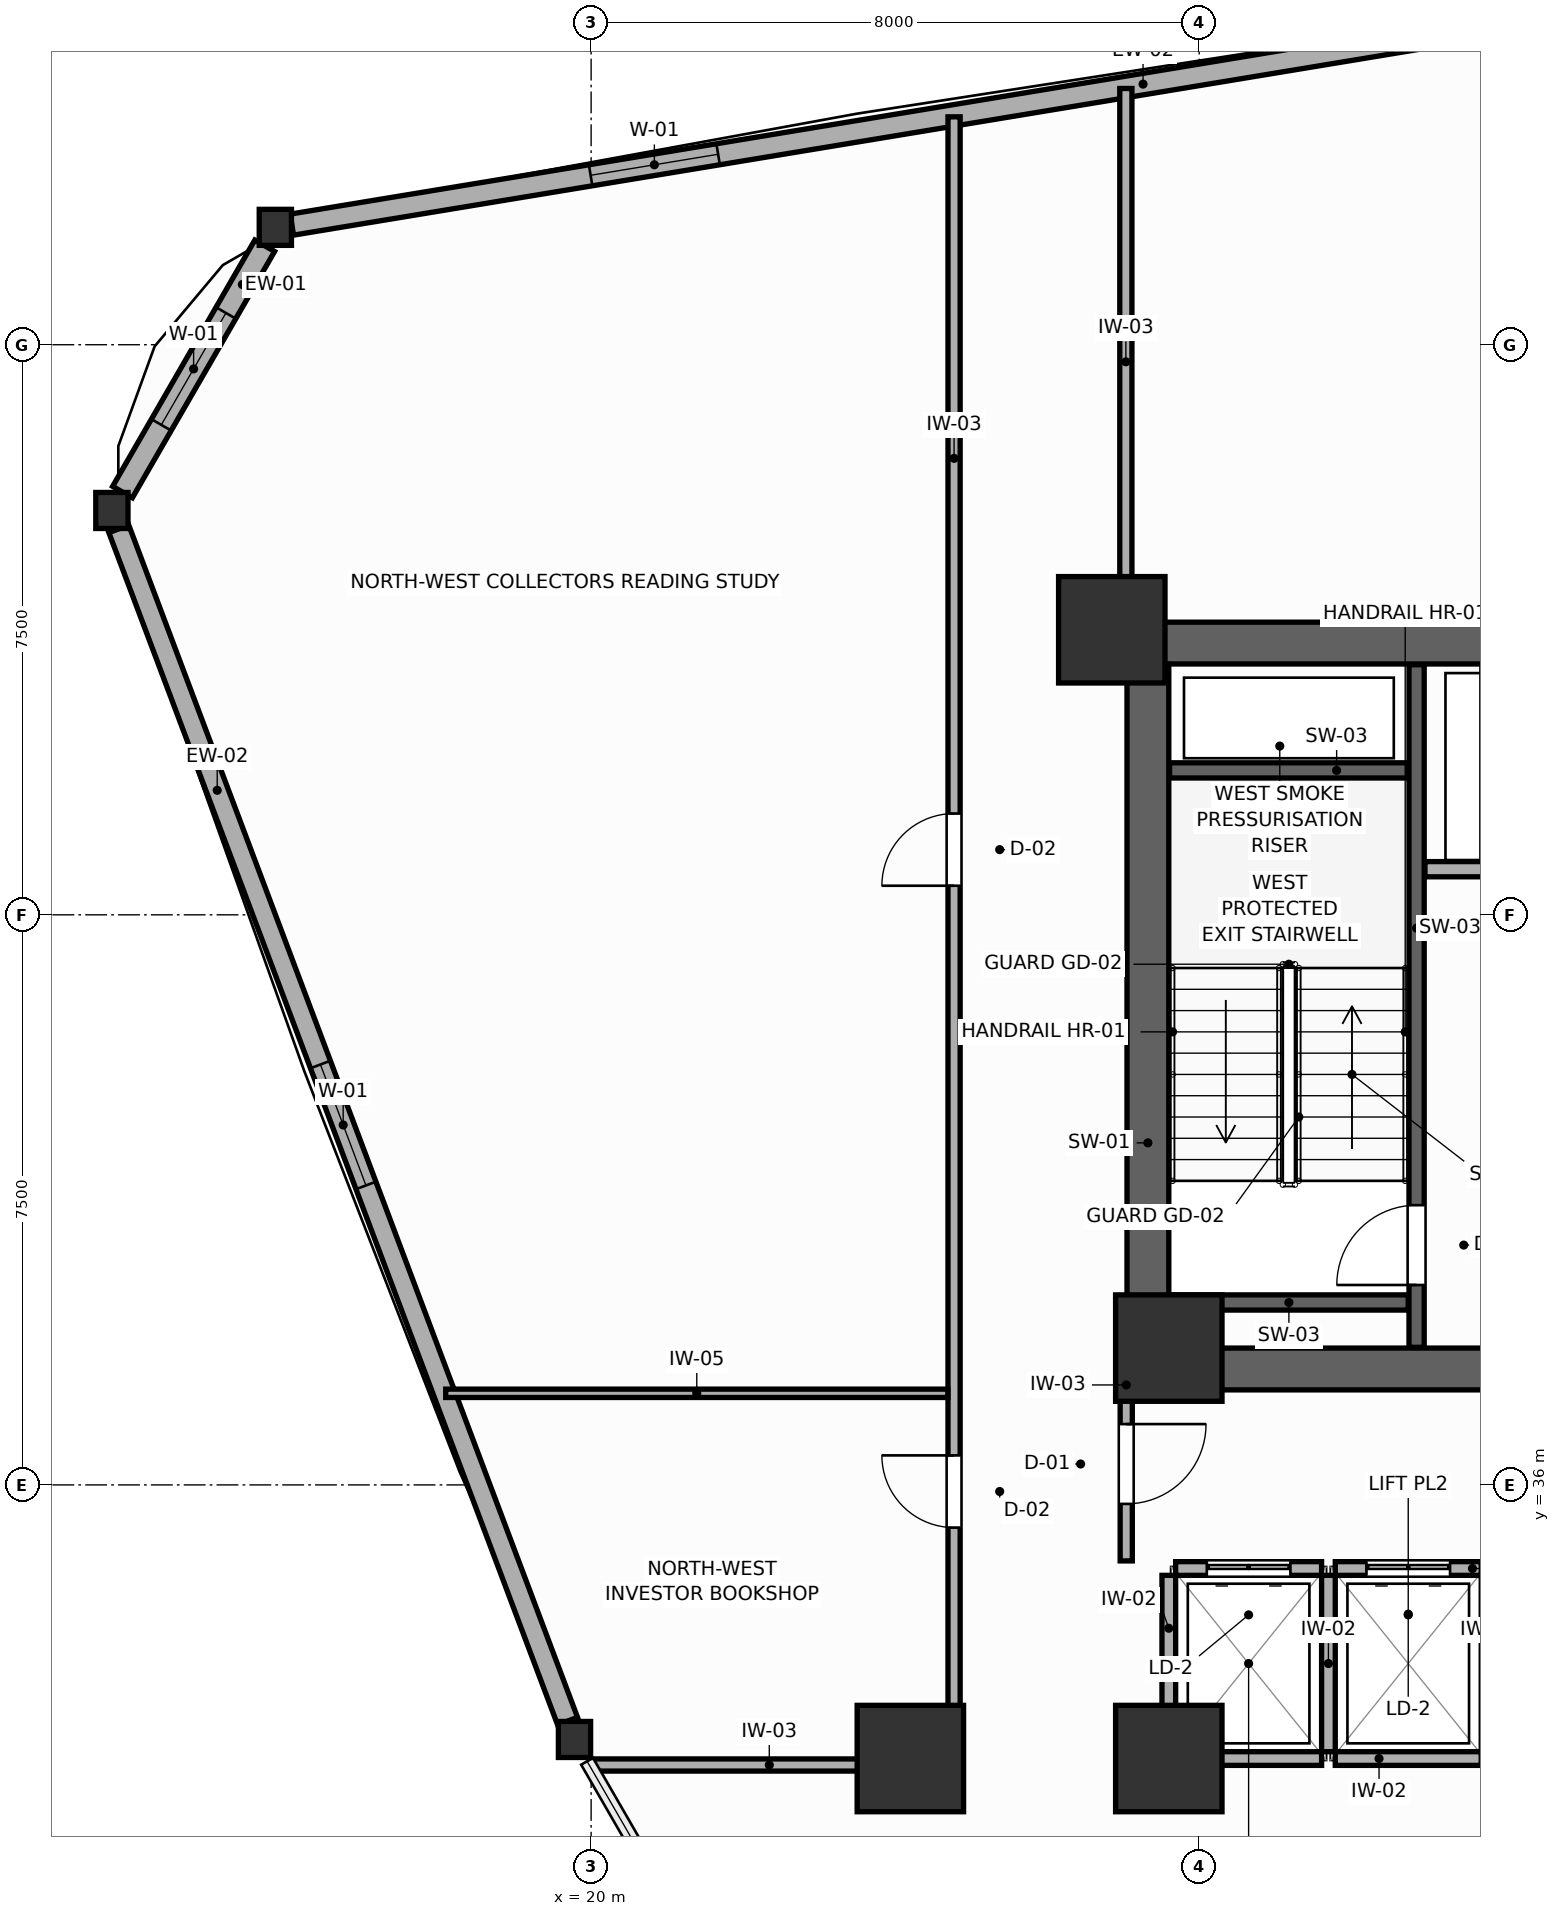
"""IFC4 building model, lengths in metres.
Left out: names, types, materials, properties, quantities, classifications, styles, units other than length and angle.
Written with IfcOpenShell. Run it as: python <this file> out.ifc"""

import sys

from ifc_helpers import new_model, si_unit, direction, frame, frame_2d, origin, origin_2d, place, context, subcontext, project, spatial, rectangle, i_section, extrude, source, transform, mapped, element, fill, save


model = new_model("IFC4")
c1 = context("Model", 3, precision=1e-05, world=origin(), true_north=direction((0.0, 1.0)))
c2 = subcontext(c1, "Body", "Model", "MODEL_VIEW")
j1 = project(units=[si_unit("LENGTHUNIT", "METRE"), si_unit("PLANEANGLEUNIT", "RADIAN")], contexts=[c1])
p1 = place(None, origin())
s1 = spatial("IfcSite", under=j1, at=p1, CompositionType="ELEMENT")
p2 = place(p1, origin())
s2 = spatial("IfcBuilding", under=s1, at=p2, CompositionType="ELEMENT")
p3 = place(p2, frame((0.0, 0.0, 87.3)))
s3 = spatial("IfcBuildingStorey", under=s2, at=p3, CompositionType="ELEMENT", Elevation=87.3)
p4 = place(p3, frame((27.05, 47.075, 0.0), z_axis=(0.0, 0.0, 1.0), x_axis=(1.0, 0.0, 0.0)))
e1 = element("IfcWall", 1, at=p4, inside=s3, PredefinedType="SHEAR", context=c2, shape_type="SweptSolid", body=[
    extrude(rectangle(XDim=17.9, YDim=0.55, at=frame_2d((8.95, 0.0))), origin(), (0.0, 0.0, 1.0), 3.9),
])
p5 = place(p3, frame((27.05, 37.525, 0.0), z_axis=(0.0, 0.0, 1.0), x_axis=(1.0, 0.0, 0.0)))
e2 = element("IfcWall", 2, at=p5, inside=s3, PredefinedType="SHEAR", context=c2, shape_type="SweptSolid", body=[
    extrude(rectangle(XDim=17.9, YDim=0.55, at=frame_2d((8.95, 0.0))), origin(), (0.0, 0.0, 1.0), 3.9),
])
p6 = place(p5, frame((4.975, 0.0, 0.0)))
e3 = element("IfcOpeningElement", 3, at=p6, cuts=e2, PredefinedType="OPENING", context=c2, shape_type="SweptSolid", body=[
    extrude(rectangle(XDim=1.05, YDim=2.1, at=frame_2d((0.525, 1.05))), frame((0.0, 0.285, 0.0), z_axis=(0.0, -1.0, 0.0), x_axis=(1.0, 0.0, 0.0)), (0.0, 0.0, 1.0), 0.57),
])
p7 = place(p5, frame((11.875, 0.0, 0.0)))
e4 = element("IfcOpeningElement", 4, at=p7, cuts=e2, PredefinedType="OPENING", context=c2, shape_type="SweptSolid", body=[
    extrude(rectangle(XDim=1.05, YDim=2.1, at=frame_2d((0.525, 1.05))), frame((0.0, 0.285, 0.0), z_axis=(0.0, -1.0, 0.0), x_axis=(1.0, 0.0, 0.0)), (0.0, 0.0, 1.0), 0.57),
])
p8 = place(p3, frame((27.325, 37.8, 0.0), z_axis=(0.0, 0.0, 1.0), x_axis=(0.0, 1.0, 0.0)))
e5 = element("IfcWall", 5, at=p8, inside=s3, PredefinedType="SHEAR", context=c2, shape_type="SweptSolid", body=[
    extrude(rectangle(XDim=9.0, YDim=0.55, at=frame_2d((4.5, 0.0))), origin(), (0.0, 0.0, 1.0), 3.9),
])
m1 = source(origin(), c2, "Body", "SweptSolid", [
    extrude(rectangle(XDim=1.4, YDim=1.4, at=origin_2d()), origin(), (0.0, 0.0, 1.0), 3.9),
])
for number, where, z_axis, x_axis in (
    (6, (26.85, 47.25, 0.0), (0.0, 0.0, 1.0), (1.0, 0.0, 0.0)),
    (7, (27.6, 37.8, 0.0), (0.0, 0.0, 1.0), (1.0, 0.0, 0.0)),
    (8, (27.6, 32.4, 0.0), (0.0, 0.0, 1.0), (1.0, 0.0, 0.0)),
    (9, (24.2, 32.4, 0.0), (0.0, 0.0, 1.0), (1.0, 0.0, 0.0)),
):
    element("IfcColumn", number, at=place(p3, frame(where, z_axis=z_axis, x_axis=x_axis)), inside=s3, PredefinedType="COLUMN", context=c2, shape_type="MappedRepresentation", body=[
        mapped(m1, transform((0.0, 0.0, 0.0), scale=1.0)),
    ])
m2 = source(origin(), c2, "Body", "SweptSolid", [
    extrude(i_section(OverallWidth=0.424, OverallDepth=0.474, WebThickness=0.045, FlangeThickness=0.072, FilletRadius=0.015, at=origin_2d()), origin(), (0.0, 0.0, 1.0), 3.9),
])
for number, where, z_axis, x_axis in (
    (10, (15.845, 52.544, 0.0), (0.0, 0.0, 1.0), (1.0, 0.0, 0.0)),
    (11, (13.695, 48.82, 0.0), (0.0, 0.0, 1.0), (1.0, 0.0, 0.0)),
    (12, (19.781, 32.651, 0.0), (0.0, 0.0, 1.0), (1.0, 0.0, 0.0)),
):
    element("IfcColumn", number, at=place(p3, frame(where, z_axis=z_axis, x_axis=x_axis)), inside=s3, PredefinedType="COLUMN", context=c2, shape_type="MappedRepresentation", body=[
        mapped(m2, transform((0.0, 0.0, 0.0), scale=1.0)),
    ])
p9 = place(p3, frame((32.674, 55.322, 0.0), z_axis=(0.0, 0.0, 1.0), x_axis=(-0.986649424809, -0.162858566012, 0.0)))
e13 = element("IfcWall", 13, at=p9, inside=s3, PredefinedType="SOLIDWALL", context=c2, shape_type="SweptSolid", body=[
    extrude(rectangle(XDim=16.836, YDim=0.28, at=frame_2d((8.418, 0.0))), origin(), (0.0, 0.0, 1.0), 3.23),
])
p10 = place(p9, frame((11.152, 0.0, 0.75)))
e14 = element("IfcOpeningElement", 14, at=p10, cuts=e13, PredefinedType="OPENING", context=c2, shape_type="SweptSolid", body=[
    extrude(rectangle(XDim=1.7, YDim=1.75, at=frame_2d((0.85, 0.875))), frame((0.0, 0.15, 0.0), z_axis=(0.0, -1.0, 0.0), x_axis=(1.0, 0.0, 0.0)), (0.0, 0.0, 1.0), 0.3),
])
p11 = place(p3, frame((15.706, 52.302, 0.0), z_axis=(0.0, 0.0, 1.0), x_axis=(-0.500012356405, -0.866018269693, 0.0)))
e15 = element("IfcWall", 15, at=p11, inside=s3, PredefinedType="SOLIDWALL", context=c2, shape_type="SweptSolid", body=[
    extrude(rectangle(XDim=3.742, YDim=0.3, at=frame_2d((1.871, 0.0))), origin(), (0.0, 0.0, 1.0), 3.23),
])
p12 = place(p11, frame((1.021, 0.0, 0.75)))
e16 = element("IfcOpeningElement", 16, at=p12, cuts=e15, PredefinedType="OPENING", context=c2, shape_type="SweptSolid", body=[
    extrude(rectangle(XDim=1.7, YDim=1.75, at=frame_2d((0.85, 0.875))), frame((0.0, 0.16, 0.0), z_axis=(0.0, -1.0, 0.0), x_axis=(1.0, 0.0, 0.0)), (0.0, 0.0, 1.0), 0.32),
])
p13 = place(p3, frame((13.786, 48.577, 0.0), z_axis=(0.0, 0.0, 1.0), x_axis=(0.352279020809, -0.935895021622, 0.0)))
e17 = element("IfcWall", 17, at=p13, inside=s3, PredefinedType="SOLIDWALL", context=c2, shape_type="SweptSolid", body=[
    extrude(rectangle(XDim=16.759, YDim=0.28, at=frame_2d((8.379, 0.0))), origin(), (0.0, 0.0, 1.0), 3.23),
])
p14 = place(p13, frame((7.53, 0.0, 0.75)))
e18 = element("IfcOpeningElement", 18, at=p14, cuts=e17, PredefinedType="OPENING", context=c2, shape_type="SweptSolid", body=[
    extrude(rectangle(XDim=1.7, YDim=1.75, at=frame_2d((0.85, 0.875))), frame((0.0, 0.15, 0.0), z_axis=(0.0, -1.0, 0.0), x_axis=(1.0, 0.0, 0.0)), (0.0, 0.0, 1.0), 0.3),
])
p15 = place(p3, frame((30.86, 37.81, 0.0), z_axis=(0.0, 0.0, 1.0), x_axis=(0.0, 1.0, 0.0)))
e19 = element("IfcWall", 19, at=p15, inside=s3, PredefinedType="SHEAR", context=c2, shape_type="SweptSolid", body=[
    extrude(rectangle(XDim=8.98, YDim=0.2, at=frame_2d((4.49, 0.0))), origin(), (0.0, 0.0, 1.0), 3.9),
])
p16 = place(p15, frame((0.82, 0.0, 0.0)))
e20 = element("IfcOpeningElement", 20, at=p16, cuts=e19, PredefinedType="OPENING", context=c2, shape_type="SweptSolid", body=[
    extrude(rectangle(XDim=1.05, YDim=2.1, at=frame_2d((0.525, 1.05))), frame((0.0, 0.11, 0.0), z_axis=(0.0, -1.0, 0.0), x_axis=(1.0, 0.0, 0.0)), (0.0, 0.0, 1.0), 0.22),
])
for number, where, z_axis, x_axis in (
    (21, (27.61, 45.4, 0.0), (0.0, 0.0, 1.0), (1.0, 0.0, 0.0)),
    (22, (27.61, 38.4, 0.0), (0.0, 0.0, 1.0), (1.0, 0.0, 0.0)),
):
    element("IfcWall", number, at=place(p3, frame(where, z_axis=z_axis, x_axis=x_axis)), inside=s3, PredefinedType="SHEAR", context=c2, shape_type="SweptSolid", body=[
        extrude(rectangle(XDim=3.14, YDim=0.2, at=frame_2d((1.57, 0.0))), origin(), (0.0, 0.0, 1.0), 3.9),
    ])
p17 = place(p3, frame((30.97, 44.1, 0.0), z_axis=(0.0, 0.0, 1.0), x_axis=(1.0, 0.0, 0.0)))
e23 = element("IfcWall", 23, at=p17, inside=s3, PredefinedType="PARTITIONING", context=c2, shape_type="SweptSolid", body=[
    extrude(rectangle(XDim=3.38, YDim=0.2, at=frame_2d((1.69, 0.0))), origin(), (0.0, 0.0, 1.0), 3.68),
])
p18 = place(p17, frame((0.9, 0.0, 0.0)))
e24 = element("IfcOpeningElement", 24, at=p18, cuts=e23, PredefinedType="OPENING", context=c2, shape_type="SweptSolid", body=[
    extrude(rectangle(XDim=1.2, YDim=2.1, at=frame_2d((0.6, 1.05))), frame((0.0, 0.11, 0.0), z_axis=(0.0, -1.0, 0.0), x_axis=(1.0, 0.0, 0.0)), (0.0, 0.0, 1.0), 0.22),
])
p19 = place(p3, frame((27.69, 34.9, 0.0), z_axis=(0.0, 0.0, 1.0), x_axis=(1.0, 0.0, 0.0)))
e25 = element("IfcWall", 25, at=p19, inside=s3, PredefinedType="PARTITIONING", context=c2, shape_type="SweptSolid", body=[
    extrude(rectangle(XDim=1.92, YDim=0.18, at=frame_2d((0.96, 0.0))), origin(), (0.0, 0.0, 1.0), 3.68),
])
p20 = place(p19, frame((0.41, 0.0, 0.0)))
e26 = element("IfcOpeningElement", 26, at=p20, cuts=e25, PredefinedType="OPENING", context=c2, shape_type="SweptSolid", body=[
    extrude(rectangle(XDim=1.1, YDim=2.1, at=frame_2d((0.55, 1.05))), frame((0.0, 0.1, 0.0), z_axis=(0.0, -1.0, 0.0), x_axis=(1.0, 0.0, 0.0)), (0.0, 0.0, 1.0), 0.2),
])
p21 = place(p3, frame((27.69, 32.4, 0.0), z_axis=(0.0, 0.0, 1.0), x_axis=(1.0, 0.0, 0.0)))
e27 = element("IfcWall", 27, at=p21, inside=s3, PredefinedType="PARTITIONING", context=c2, shape_type="SweptSolid", body=[
    extrude(rectangle(XDim=1.92, YDim=0.18, at=frame_2d((0.96, 0.0))), origin(), (0.0, 0.0, 1.0), 3.18),
])
p22 = place(p3, frame((27.6, 32.49, 0.0), z_axis=(0.0, 0.0, 1.0), x_axis=(0.0, 1.0, 0.0)))
e28 = element("IfcWall", 28, at=p22, inside=s3, PredefinedType="PARTITIONING", context=c2, shape_type="SweptSolid", body=[
    extrude(rectangle(XDim=2.32, YDim=0.18, at=frame_2d((1.16, 0.0))), origin(), (0.0, 0.0, 1.0), 3.68),
])
p23 = place(p3, frame((29.79, 34.9, 0.0), z_axis=(0.0, 0.0, 1.0), x_axis=(1.0, 0.0, 0.0)))
e29 = element("IfcWall", 29, at=p23, inside=s3, PredefinedType="PARTITIONING", context=c2, shape_type="SweptSolid", body=[
    extrude(rectangle(XDim=1.92, YDim=0.18, at=frame_2d((0.96, 0.0))), origin(), (0.0, 0.0, 1.0), 3.68),
])
p24 = place(p23, frame((0.41, 0.0, 0.0)))
e30 = element("IfcOpeningElement", 30, at=p24, cuts=e29, PredefinedType="OPENING", context=c2, shape_type="SweptSolid", body=[
    extrude(rectangle(XDim=1.1, YDim=2.1, at=frame_2d((0.55, 1.05))), frame((0.0, 0.1, 0.0), z_axis=(0.0, -1.0, 0.0), x_axis=(1.0, 0.0, 0.0)), (0.0, 0.0, 1.0), 0.2),
])
p25 = place(p3, frame((29.79, 32.4, 0.0), z_axis=(0.0, 0.0, 1.0), x_axis=(1.0, 0.0, 0.0)))
e31 = element("IfcWall", 31, at=p25, inside=s3, PredefinedType="PARTITIONING", context=c2, shape_type="SweptSolid", body=[
    extrude(rectangle(XDim=1.92, YDim=0.18, at=frame_2d((0.96, 0.0))), origin(), (0.0, 0.0, 1.0), 3.18),
])
p26 = place(p3, frame((29.7, 32.49, 0.0), z_axis=(0.0, 0.0, 1.0), x_axis=(0.0, 1.0, 0.0)))
e32 = element("IfcWall", 32, at=p26, inside=s3, PredefinedType="PARTITIONING", context=c2, shape_type="SweptSolid", body=[
    extrude(rectangle(XDim=2.32, YDim=0.18, at=frame_2d((1.16, 0.0))), origin(), (0.0, 0.0, 1.0), 3.68),
])
p27 = place(p3, frame((27.04, 35.0, 0.0), z_axis=(0.0, 0.0, 1.0), x_axis=(0.0, 1.0, 0.0)))
e33 = element("IfcWall", 33, at=p27, inside=s3, PredefinedType="PARTITIONING", context=c2, shape_type="SweptSolid", body=[
    extrude(rectangle(XDim=2.65, YDim=0.16, at=frame_2d((1.325, 0.0))), origin(), (0.0, 0.0, 1.0), 3.68),
])
p28 = place(p27, frame((0.75, 0.0, 0.0)))
e34 = element("IfcOpeningElement", 34, at=p28, cuts=e33, PredefinedType="OPENING", context=c2, shape_type="SweptSolid", body=[
    extrude(rectangle(XDim=1.05, YDim=2.1, at=frame_2d((0.525, 1.05))), frame((0.0, 0.09, 0.0), z_axis=(0.0, -1.0, 0.0), x_axis=(1.0, 0.0, 0.0)), (0.0, 0.0, 1.0), 0.18),
])
p29 = place(p3, frame((24.775, 32.31, 0.0), z_axis=(0.0, 0.0, 1.0), x_axis=(0.0, 1.0, 0.0)))
e35 = element("IfcWall", 35, at=p29, inside=s3, PredefinedType="PARTITIONING", context=c2, shape_type="SweptSolid", body=[
    extrude(rectangle(XDim=21.688, YDim=0.16, at=frame_2d((10.844, 0.0))), origin(), (0.0, 0.0, 1.0), 3.68),
])
p30 = place(p29, frame((3.128, 0.0, 0.0)))
e36 = element("IfcOpeningElement", 36, at=p30, cuts=e35, PredefinedType="OPENING", context=c2, shape_type="SweptSolid", body=[
    extrude(rectangle(XDim=0.95, YDim=2.05, at=frame_2d((0.475, 1.025))), frame((0.0, 0.09, 0.0), z_axis=(0.0, -1.0, 0.0), x_axis=(1.0, 0.0, 0.0)), (0.0, 0.0, 1.0), 0.18),
])
p31 = place(p29, frame((11.573, 0.0, 0.0)))
e37 = element("IfcOpeningElement", 37, at=p31, cuts=e35, PredefinedType="OPENING", context=c2, shape_type="SweptSolid", body=[
    extrude(rectangle(XDim=0.95, YDim=2.05, at=frame_2d((0.475, 1.025))), frame((0.0, 0.09, 0.0), z_axis=(0.0, -1.0, 0.0), x_axis=(1.0, 0.0, 0.0)), (0.0, 0.0, 1.0), 0.18),
])
p32 = place(p3, frame((27.035, 47.18, 0.0), z_axis=(0.0, 0.0, 1.0), x_axis=(0.0, 1.0, 0.0)))
e38 = element("IfcWall", 38, at=p32, inside=s3, PredefinedType="PARTITIONING", context=c2, shape_type="SweptSolid", body=[
    extrude(rectangle(XDim=7.191, YDim=0.16, at=frame_2d((3.596, 0.0))), origin(), (0.0, 0.0, 1.0), 3.68),
])
p33 = place(p3, frame((19.995, 32.315, 0.0), z_axis=(0.0, 0.0, 1.0), x_axis=(1.0, 0.0, 0.0)))
e39 = element("IfcWall", 39, at=p33, inside=s3, PredefinedType="PARTITIONING", context=c2, shape_type="SweptSolid", body=[
    extrude(rectangle(XDim=4.698, YDim=0.16, at=frame_2d((2.349, 0.0))), origin(), (0.0, 0.0, 1.0), 3.18),
])
p34 = place(p3, frame((18.087, 37.205, 0.0), z_axis=(0.0, 0.0, 1.0), x_axis=(1.0, 0.0, 0.0)))
e40 = element("IfcWall", 40, at=p34, inside=s3, PredefinedType="MOVABLE", context=c2, shape_type="SweptSolid", body=[
    extrude(rectangle(XDim=6.606, YDim=0.11, at=frame_2d((3.303, 0.0))), origin(), (0.0, 0.0, 1.0), 3.68),
])
p35 = place(p10, origin())
e41 = element("IfcWindow", 41, at=p35, inside=s3, PartitioningType="SINGLE_PANEL", PredefinedType="WINDOW", context=c2, shape_type="SweptSolid", body=[
    extrude(rectangle(XDim=1.7, YDim=1.75, at=frame_2d((0.85, 0.875))), frame((0.0, 0.03, 0.0), z_axis=(0.0, -1.0, 0.0), x_axis=(1.0, 0.0, 0.0)), (0.0, 0.0, 1.0), 0.06),
])
fill(e14, e41)
p36 = place(p12, origin())
e42 = element("IfcWindow", 42, at=p36, inside=s3, PartitioningType="SINGLE_PANEL", PredefinedType="WINDOW", context=c2, shape_type="SweptSolid", body=[
    extrude(rectangle(XDim=1.7, YDim=1.75, at=frame_2d((0.85, 0.875))), frame((0.0, 0.03, 0.0), z_axis=(0.0, -1.0, 0.0), x_axis=(1.0, 0.0, 0.0)), (0.0, 0.0, 1.0), 0.06),
])
fill(e16, e42)
p37 = place(p14, origin())
e43 = element("IfcWindow", 43, at=p37, inside=s3, PartitioningType="SINGLE_PANEL", PredefinedType="WINDOW", context=c2, shape_type="SweptSolid", body=[
    extrude(rectangle(XDim=1.7, YDim=1.75, at=frame_2d((0.85, 0.875))), frame((0.0, 0.03, 0.0), z_axis=(0.0, -1.0, 0.0), x_axis=(1.0, 0.0, 0.0)), (0.0, 0.0, 1.0), 0.06),
])
fill(e18, e43)
p38 = place(p16, origin())
e44 = element("IfcDoor", 44, at=p38, inside=s3, OperationType="SINGLE_SWING_LEFT", PredefinedType="DOOR", context=c2, shape_type="SweptSolid", body=[
    extrude(rectangle(XDim=1.05, YDim=2.1, at=frame_2d((0.525, 1.05))), frame((0.0, 0.025, 0.0), z_axis=(0.0, -1.0, 0.0), x_axis=(1.0, 0.0, 0.0)), (0.0, 0.0, 1.0), 0.05),
])
fill(e20, e44)
p39 = place(p20, origin())
e45 = element("IfcDoor", 45, at=p39, inside=s3, OperationType="DOUBLE_DOOR_SLIDING", PredefinedType="DOOR", context=c2, shape_type="SweptSolid", body=[
    extrude(rectangle(XDim=1.1, YDim=2.1, at=frame_2d((0.55, 1.05))), frame((0.0, 0.025, 0.0), z_axis=(0.0, -1.0, 0.0), x_axis=(1.0, 0.0, 0.0)), (0.0, 0.0, 1.0), 0.05),
])
fill(e26, e45)
p40 = place(p24, origin())
e46 = element("IfcDoor", 46, at=p40, inside=s3, OperationType="DOUBLE_DOOR_SLIDING", PredefinedType="DOOR", context=c2, shape_type="SweptSolid", body=[
    extrude(rectangle(XDim=1.1, YDim=2.1, at=frame_2d((0.55, 1.05))), frame((0.0, 0.025, 0.0), z_axis=(0.0, -1.0, 0.0), x_axis=(1.0, 0.0, 0.0)), (0.0, 0.0, 1.0), 0.05),
])
fill(e30, e46)
p41 = place(p28, frame((1.05, 0.0, 0.0), z_axis=(0.0, 0.0, 1.0), x_axis=(-1.0, 0.0, 0.0)))
e47 = element("IfcDoor", 47, at=p41, inside=s3, OperationType="SINGLE_SWING_LEFT", PredefinedType="DOOR", context=c2, shape_type="SweptSolid", body=[
    extrude(rectangle(XDim=1.05, YDim=2.1, at=frame_2d((0.525, 1.05))), frame((0.0, 0.025, 0.0), z_axis=(0.0, -1.0, 0.0), x_axis=(1.0, 0.0, 0.0)), (0.0, 0.0, 1.0), 0.05),
])
fill(e34, e47)
p42 = place(p30, origin())
e48 = element("IfcDoor", 48, at=p42, inside=s3, OperationType="SINGLE_SWING_RIGHT", PredefinedType="DOOR", context=c2, shape_type="SweptSolid", body=[
    extrude(rectangle(XDim=0.95, YDim=2.05, at=frame_2d((0.475, 1.025))), frame((0.0, 0.025, 0.0), z_axis=(0.0, -1.0, 0.0), x_axis=(1.0, 0.0, 0.0)), (0.0, 0.0, 1.0), 0.05),
])
fill(e36, e48)
p43 = place(p31, origin())
e49 = element("IfcDoor", 49, at=p43, inside=s3, OperationType="SINGLE_SWING_LEFT", PredefinedType="DOOR", context=c2, shape_type="SweptSolid", body=[
    extrude(rectangle(XDim=0.95, YDim=2.05, at=frame_2d((0.475, 1.025))), frame((0.0, 0.025, 0.0), z_axis=(0.0, -1.0, 0.0), x_axis=(1.0, 0.0, 0.0)), (0.0, 0.0, 1.0), 0.05),
])
fill(e37, e49)
save(model, sys.argv[1])
